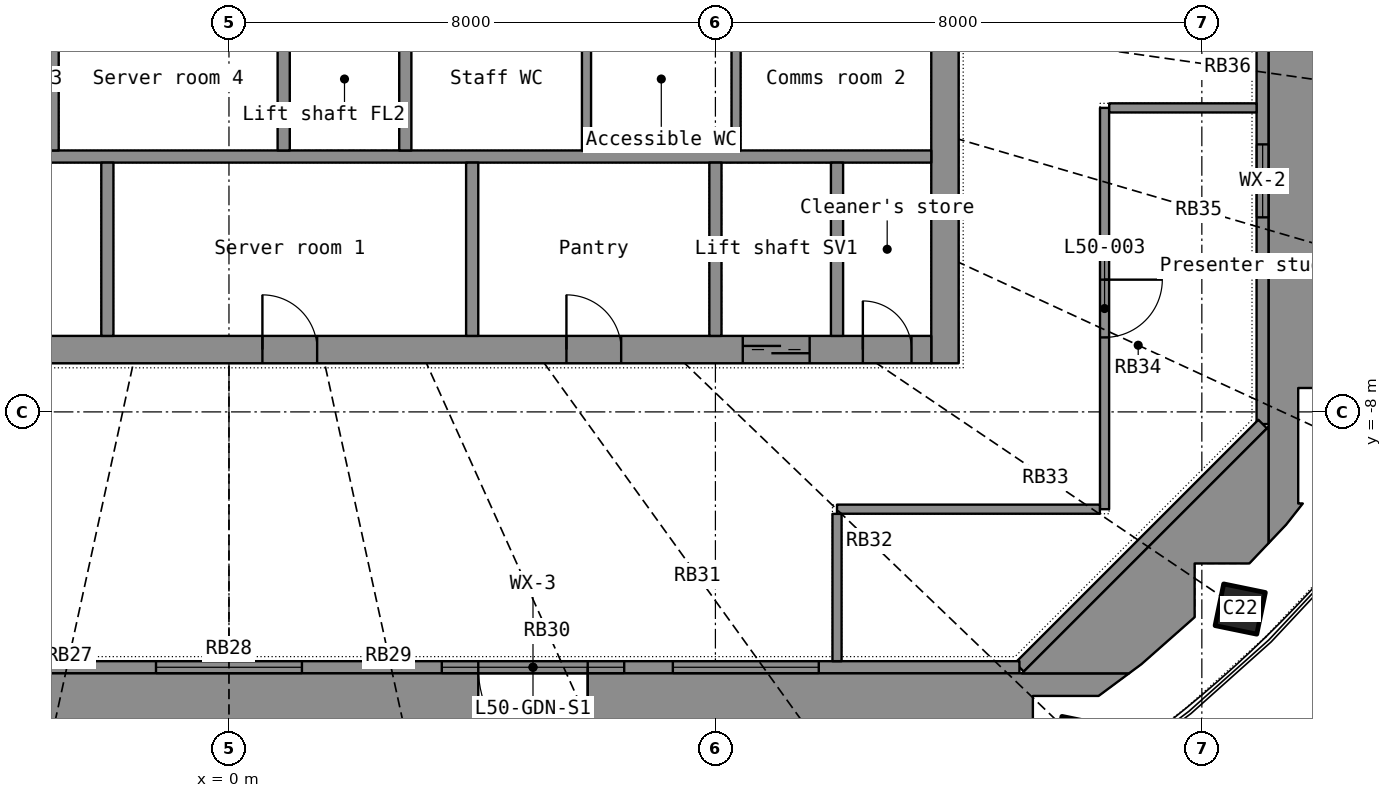
"""IFC4 building model, lengths in metres.
Left out: names, types, materials, properties, quantities, classifications, styles, units other than length and angle.
Written with IfcOpenShell. Run it as: python <this file> out.ifc"""

import sys

from ifc_helpers import new_model, si_unit, direction, frame, frame_2d, origin, origin_2d, place, context, subcontext, project, spatial, polyline, rectangle, hollow_rectangle, outline, extrude, element, fill, save


model = new_model("IFC4")
c1 = context("Model", 3, precision=1e-05, world=origin(), true_north=direction((0.0, 1.0)))
c2 = subcontext(c1, "Body", "Model", "MODEL_VIEW")
j1 = project(units=[si_unit("LENGTHUNIT", "METRE"), si_unit("PLANEANGLEUNIT", "RADIAN")], contexts=[c1])
p1 = place(None, origin())
s1 = spatial("IfcSite", under=j1, at=p1, CompositionType="ELEMENT")
p2 = place(p1, origin())
s2 = spatial("IfcBuilding", under=s1, at=p2, CompositionType="ELEMENT")
p3 = place(p2, frame((0.0, 0.0, 205.2)))
s3 = spatial("IfcBuildingStorey", under=s2, at=p3, CompositionType="ELEMENT", Elevation=205.2)
p4 = place(p3, frame((13.971, -13.421, 0.0), z_axis=(-0.022258382, 0.021697801, 0.999516768), x_axis=(-0.828160065, -0.560456529, -0.006275862)))
e1 = element("IfcColumn", 1, at=p4, inside=s3, PredefinedType="COLUMN", context=c2, shape_type="SweptSolid", body=[
    extrude(hollow_rectangle(XDim=0.7, YDim=0.7, WallThickness=0.025, at=origin_2d()), origin(), (0.0, 0.0, 1.0), 7.404),
])
p5 = place(p3, frame((16.631, -11.243, 0.0), z_axis=(-0.026511305, 0.018201791, 0.999482789), x_axis=(-0.720516136, -0.693407857, -0.006483911)))
e2 = element("IfcColumn", 2, at=p5, inside=s3, PredefinedType="COLUMN", context=c2, shape_type="SweptSolid", body=[
    extrude(hollow_rectangle(XDim=0.7, YDim=0.7, WallThickness=0.025, at=origin_2d()), origin(), (0.0, 0.0, 1.0), 7.404),
])
p6 = place(p3, frame((18.535, -8.557, 0.0), z_axis=(-0.029972624, 0.014178469, 0.999450155), x_axis=(-0.583640912, -0.811989828, -0.005983767)))
e3 = element("IfcColumn", 3, at=p6, inside=s3, PredefinedType="COLUMN", context=c2, shape_type="SweptSolid", body=[
    extrude(hollow_rectangle(XDim=1.1, YDim=1.1, WallThickness=0.032, at=origin_2d()), origin(), (0.0, 0.0, 1.0), 7.404),
])
p7 = place(p3, frame((17.0, 8.2, 0.08), z_axis=(0.0, 0.0, 1.0), x_axis=(0.0, -1.0, 0.0)))
e4 = element("IfcWall", 4, at=p7, inside=s3, PredefinedType="STANDARD", context=c2, shape_type="SweptSolid", body=[
    extrude(rectangle(XDim=16.4, YDim=0.2, at=frame_2d((8.2, 0.0))), origin(), (0.0, 0.0, 1.0), 7.12),
])
p8 = place(p7, frame((7.3, 0.0, 0.0)))
e5 = element("IfcOpeningElement", 5, at=p8, cuts=e4, PredefinedType="OPENING", context=c2, shape_type="SweptSolid", body=[
    extrude(rectangle(XDim=1.8, YDim=2.4, at=frame_2d((0.9, 1.2))), frame((0.0, 0.11, 0.0), z_axis=(0.0, -1.0, 0.0), x_axis=(1.0, 0.0, 0.0)), (0.0, 0.0, 1.0), 0.22),
])
p9 = place(p7, frame((3.4, 0.0, 0.1)))
e6 = element("IfcOpeningElement", 6, at=p9, cuts=e4, PredefinedType="OPENING", context=c2, shape_type="SweptSolid", body=[
    extrude(rectangle(XDim=1.2, YDim=2.2, at=frame_2d((0.6, 1.1))), frame((0.0, 0.11, 0.0), z_axis=(0.0, -1.0, 0.0), x_axis=(1.0, 0.0, 0.0)), (0.0, 0.0, 1.0), 0.22),
])
p10 = place(p7, frame((11.8, 0.0, 0.1)))
e7 = element("IfcOpeningElement", 7, at=p10, cuts=e4, PredefinedType="OPENING", context=c2, shape_type="SweptSolid", body=[
    extrude(rectangle(XDim=1.2, YDim=2.2, at=frame_2d((0.6, 1.1))), frame((0.0, 0.11, 0.0), z_axis=(0.0, -1.0, 0.0), x_axis=(1.0, 0.0, 0.0)), (0.0, 0.0, 1.0), 0.22),
])
p11 = place(p3, frame((17.0, -8.2, 0.08), z_axis=(0.0, 0.0, 1.0), x_axis=(-0.707106781, -0.707106781, 0.0)))
e8 = element("IfcWall", 8, at=p11, inside=s3, PredefinedType="STANDARD", context=c2, shape_type="SweptSolid", body=[
    extrude(rectangle(XDim=5.657, YDim=0.2, at=frame_2d((2.828, 0.0))), origin(), (0.0, 0.0, 1.0), 7.12),
])
p12 = place(p3, frame((13.0, -12.2, 0.08), z_axis=(0.0, 0.0, 1.0), x_axis=(-1.0, 0.0, 0.0)))
e9 = element("IfcWall", 9, at=p12, inside=s3, PredefinedType="STANDARD", context=c2, shape_type="SweptSolid", body=[
    extrude(rectangle(XDim=26.0, YDim=0.2, at=frame_2d((13.0, 0.0))), origin(), (0.0, 0.0, 1.0), 7.12),
])
p13 = place(p12, frame((7.1, 0.0, 0.0)))
e10 = element("IfcOpeningElement", 10, at=p13, cuts=e9, PredefinedType="OPENING", context=c2, shape_type="SweptSolid", body=[
    extrude(rectangle(XDim=1.8, YDim=2.4, at=frame_2d((0.9, 1.2))), frame((0.0, 0.11, 0.0), z_axis=(0.0, -1.0, 0.0), x_axis=(1.0, 0.0, 0.0)), (0.0, 0.0, 1.0), 0.22),
])
p14 = place(p12, frame((17.1, 0.0, 0.0)))
e11 = element("IfcOpeningElement", 11, at=p14, cuts=e9, PredefinedType="OPENING", context=c2, shape_type="SweptSolid", body=[
    extrude(rectangle(XDim=1.8, YDim=2.4, at=frame_2d((0.9, 1.2))), frame((0.0, 0.11, 0.0), z_axis=(0.0, -1.0, 0.0), x_axis=(1.0, 0.0, 0.0)), (0.0, 0.0, 1.0), 0.22),
])
p15 = place(p12, frame((3.3, 0.0, 0.9)))
e12 = element("IfcOpeningElement", 12, at=p15, cuts=e9, PredefinedType="OPENING", context=c2, shape_type="SweptSolid", body=[
    extrude(rectangle(XDim=2.4, YDim=1.5, at=frame_2d((1.2, 0.75))), frame((0.0, 0.11, 0.0), z_axis=(0.0, -1.0, 0.0), x_axis=(1.0, 0.0, 0.0)), (0.0, 0.0, 1.0), 0.22),
])
p16 = place(p12, frame((11.8, 0.0, 0.9)))
e13 = element("IfcOpeningElement", 13, at=p16, cuts=e9, PredefinedType="OPENING", context=c2, shape_type="SweptSolid", body=[
    extrude(rectangle(XDim=2.4, YDim=1.5, at=frame_2d((1.2, 0.75))), frame((0.0, 0.11, 0.0), z_axis=(0.0, -1.0, 0.0), x_axis=(1.0, 0.0, 0.0)), (0.0, 0.0, 1.0), 0.22),
])
p17 = place(p12, frame((20.3, 0.0, 0.9)))
e14 = element("IfcOpeningElement", 14, at=p17, cuts=e9, PredefinedType="OPENING", context=c2, shape_type="SweptSolid", body=[
    extrude(rectangle(XDim=2.4, YDim=1.5, at=frame_2d((1.2, 0.75))), frame((0.0, 0.11, 0.0), z_axis=(0.0, -1.0, 0.0), x_axis=(1.0, 0.0, 0.0)), (0.0, 0.0, 1.0), 0.22),
])
p18 = place(p12, frame((6.5, 0.0, 3.2)))
e15 = element("IfcOpeningElement", 15, at=p18, cuts=e9, PredefinedType="OPENING", context=c2, shape_type="SweptSolid", body=[
    extrude(rectangle(XDim=3.0, YDim=1.0, at=frame_2d((1.5, 0.5))), frame((0.0, 0.11, 0.0), z_axis=(0.0, -1.0, 0.0), x_axis=(1.0, 0.0, 0.0)), (0.0, 0.0, 1.0), 0.22),
])
p19 = place(p12, frame((16.5, 0.0, 3.2)))
e16 = element("IfcOpeningElement", 16, at=p19, cuts=e9, PredefinedType="OPENING", context=c2, shape_type="SweptSolid", body=[
    extrude(rectangle(XDim=3.0, YDim=1.0, at=frame_2d((1.5, 0.5))), frame((0.0, 0.11, 0.0), z_axis=(0.0, -1.0, 0.0), x_axis=(1.0, 0.0, 0.0)), (0.0, 0.0, 1.0), 0.22),
])
p20 = place(p3, frame((0.0, 0.0, -0.4)))
e17 = element("IfcWall", 17, at=p20, inside=s3, PredefinedType="ELEMENTEDWALL", context=c2, shape_type="SweptSolid", body=[
    extrude(outline(polyline([(1.85, -17.113), (3.032, -16.987), (3.032, -16.56), (4.1, -16.56), (4.1, -12.3), (-4.1, -12.3), (-4.1, -16.56), (-3.032, -16.56), (-3.032, -16.987), (-1.85, -17.113), (-0.95, -17.145), (-0.95, -16.331), (0.95, -16.331), (0.95, -17.145), (1.85, -17.113)])), origin(), (0.0, 0.0, 1.0), 1.58),
])
p21 = place(p3, frame((0.0, 0.0, -0.4)))
e18 = element("IfcWall", 18, at=p21, inside=s3, PredefinedType="ELEMENTEDWALL", context=c2, shape_type="SweptSolid", body=[
    extrude(outline(polyline([(14.803, -12.3), (13.042, -12.3), (5.9, -12.3), (5.9, -16.49), (6.696, -16.286), (6.696, -15.756), (8.196, -15.756), (8.196, -15.829), (8.97, -15.569), (9.8, -15.22), (9.8, -13.974), (11.7, -13.974), (11.7, -14.317), (12.175, -14.072), (13.221, -13.422), (13.221, -12.671), (14.302, -12.671), (14.803, -12.3)])), origin(), (0.0, 0.0, 1.0), 1.58),
])
p22 = place(p3, frame((0.0, 0.0, -0.4)))
e19 = element("IfcWall", 19, at=p22, inside=s3, PredefinedType="ELEMENTEDWALL", context=c2, shape_type="SweptSolid", body=[
    extrude(outline(polyline([(17.1, -10.156), (17.1, -8.241), (13.042, -12.3), (14.803, -12.3), (15.009, -12.147), (15.881, -11.377), (15.881, -10.493), (16.781, -10.493), (17.1, -10.156)])), origin(), (0.0, 0.0, 1.0), 1.58),
])
p23 = place(p3, frame((0.0, 0.0, -0.4)))
e20 = element("IfcWall", 20, at=p23, inside=s3, PredefinedType="ELEMENTEDWALL", context=c2, shape_type="SweptSolid", body=[
    extrude(outline(polyline([(20.503, -4.446), (20.687, -3.773), (20.567, -3.773), (20.567, -2.273), (21.019, -2.273), (21.145, -1.497), (21.175, -0.95), (20.39, -0.95), (20.39, -0.9), (17.1, -0.9), (17.1, -8.241), (17.1, -10.156), (17.387, -9.853), (17.66, -9.507), (17.585, -9.507), (17.585, -7.607), (19.014, -7.607), (19.237, -7.26), (19.606, -6.54), (19.606, -5.212), (20.205, -5.212), (20.503, -4.446)])), origin(), (0.0, 0.0, 1.0), 1.58),
])
p24 = place(p3, frame((11.775, -7.2, 0.0), z_axis=(0.0, 0.0, 1.0), x_axis=(0.0, 1.0, 0.0)))
e21 = element("IfcWall", 21, at=p24, inside=s3, PredefinedType="SHEAR", context=c2, shape_type="SweptSolid", body=[
    extrude(rectangle(XDim=14.4, YDim=0.45, at=frame_2d((7.2, 0.0))), origin(), (0.0, 0.0, 1.0), 7.0),
])
p25 = place(p24, frame((6.5, 0.0, 0.0)))
e22 = element("IfcOpeningElement", 22, at=p25, cuts=e21, PredefinedType="OPENING", context=c2, shape_type="SweptSolid", body=[
    extrude(rectangle(XDim=1.4, YDim=2.2, at=frame_2d((0.7, 1.1))), frame((0.0, 0.235, 0.0), z_axis=(0.0, -1.0, 0.0), x_axis=(1.0, 0.0, 0.0)), (0.0, 0.0, 1.0), 0.47),
])
p26 = place(p3, frame((-11.55, -6.975, 0.0), z_axis=(0.0, 0.0, 1.0), x_axis=(1.0, 0.0, 0.0)))
e23 = element("IfcWall", 23, at=p26, inside=s3, PredefinedType="SHEAR", context=c2, shape_type="SweptSolid", body=[
    extrude(rectangle(XDim=23.1, YDim=0.45, at=frame_2d((11.55, 0.0))), origin(), (0.0, 0.0, 1.0), 7.0),
])
p27 = place(p26, frame((20.0, 0.0, 0.0)))
e24 = element("IfcOpeningElement", 24, at=p27, cuts=e23, PredefinedType="OPENING", context=c2, shape_type="SweptSolid", body=[
    extrude(rectangle(XDim=1.1, YDim=2.2, at=frame_2d((0.55, 1.1))), frame((0.0, 0.235, 0.0), z_axis=(0.0, -1.0, 0.0), x_axis=(1.0, 0.0, 0.0)), (0.0, 0.0, 1.0), 0.47),
])
p28 = place(p26, frame((5.1, 0.0, 0.0)))
e25 = element("IfcOpeningElement", 25, at=p28, cuts=e23, PredefinedType="OPENING", context=c2, shape_type="SweptSolid", body=[
    extrude(rectangle(XDim=0.9, YDim=2.1, at=frame_2d((0.45, 1.05))), frame((0.0, 0.235, 0.0), z_axis=(0.0, -1.0, 0.0), x_axis=(1.0, 0.0, 0.0)), (0.0, 0.0, 1.0), 0.47),
])
p29 = place(p26, frame((12.1, 0.0, 0.0)))
e26 = element("IfcOpeningElement", 26, at=p29, cuts=e23, PredefinedType="OPENING", context=c2, shape_type="SweptSolid", body=[
    extrude(rectangle(XDim=0.9, YDim=2.1, at=frame_2d((0.45, 1.05))), frame((0.0, 0.235, 0.0), z_axis=(0.0, -1.0, 0.0), x_axis=(1.0, 0.0, 0.0)), (0.0, 0.0, 1.0), 0.47),
])
p30 = place(p26, frame((17.1, 0.0, 0.0)))
e27 = element("IfcOpeningElement", 27, at=p30, cuts=e23, PredefinedType="OPENING", context=c2, shape_type="SweptSolid", body=[
    extrude(rectangle(XDim=0.9, YDim=2.1, at=frame_2d((0.45, 1.05))), frame((0.0, 0.235, 0.0), z_axis=(0.0, -1.0, 0.0), x_axis=(1.0, 0.0, 0.0)), (0.0, 0.0, 1.0), 0.47),
])
p31 = place(p26, frame((0.325, 0.0, 0.0)))
e28 = element("IfcOpeningElement", 28, at=p31, cuts=e23, PredefinedType="OPENING", context=c2, shape_type="SweptSolid", body=[
    extrude(rectangle(XDim=0.8, YDim=2.05, at=frame_2d((0.4, 1.025))), frame((0.0, 0.235, 0.0), z_axis=(0.0, -1.0, 0.0), x_axis=(1.0, 0.0, 0.0)), (0.0, 0.0, 1.0), 0.47),
])
p32 = place(p26, frame((21.975, 0.0, 0.0)))
e29 = element("IfcOpeningElement", 29, at=p32, cuts=e23, PredefinedType="OPENING", context=c2, shape_type="SweptSolid", body=[
    extrude(rectangle(XDim=0.8, YDim=2.05, at=frame_2d((0.4, 1.025))), frame((0.0, 0.235, 0.0), z_axis=(0.0, -1.0, 0.0), x_axis=(1.0, 0.0, 0.0)), (0.0, 0.0, 1.0), 0.47),
])
p33 = place(p3, frame((-11.55, -3.8, 0.0), z_axis=(0.0, 0.0, 1.0), x_axis=(1.0, 0.0, 0.0)))
e30 = element("IfcWall", 30, at=p33, inside=s3, PredefinedType="SHEAR", context=c2, shape_type="SweptSolid", body=[
    extrude(rectangle(XDim=23.1, YDim=0.2, at=frame_2d((11.55, 0.0))), origin(), (0.0, 0.0, 1.0), 7.0),
])
for number, where, z_axis, x_axis in (
    (31, (8.0, -6.75, 0.0), (0.0, 0.0, 1.0), (0.0, 1.0, 0.0)),
    (32, (10.0, -6.75, 0.0), (0.0, 0.0, 1.0), (0.0, 1.0, 0.0)),
):
    element("IfcWall", number, at=place(p3, frame(where, z_axis=z_axis, x_axis=x_axis)), inside=s3, PredefinedType="SHEAR", context=c2, shape_type="SweptSolid", body=[
        extrude(rectangle(XDim=2.85, YDim=0.2, at=frame_2d((1.425, 0.0))), origin(), (0.0, 0.0, 1.0), 7.0),
    ])
for number, where, z_axis, x_axis in (
    (33, (-2.0, -6.75, 0.0), (0.0, 0.0, 1.0), (0.0, 1.0, 0.0)),
    (34, (4.0, -6.75, 0.0), (0.0, 0.0, 1.0), (0.0, 1.0, 0.0)),
):
    element("IfcWall", number, at=place(p3, frame(where, z_axis=z_axis, x_axis=x_axis)), inside=s3, PredefinedType="PARTITIONING", context=c2, shape_type="SweptSolid", body=[
        extrude(rectangle(XDim=2.85, YDim=0.2, at=frame_2d((1.425, 0.0))), origin(), (0.0, 0.0, 1.0), 7.0),
    ])
p34 = place(p3, frame((-2.9, -3.7, 0.0), z_axis=(0.0, 0.0, 1.0), x_axis=(0.0, 1.0, 0.0)))
e35 = element("IfcWall", 35, at=p34, inside=s3, PredefinedType="SHEAR", context=c2, shape_type="SweptSolid", body=[
    extrude(rectangle(XDim=7.4, YDim=0.2, at=frame_2d((3.7, 0.0))), origin(), (0.0, 0.0, 1.0), 7.0),
])
p35 = place(p34, frame((3.1, 0.0, 0.0)))
e36 = element("IfcOpeningElement", 36, at=p35, cuts=e35, PredefinedType="OPENING", context=c2, shape_type="SweptSolid", body=[
    extrude(rectangle(XDim=1.2, YDim=2.2, at=frame_2d((0.6, 1.1))), frame((0.0, 0.11, 0.0), z_axis=(0.0, -1.0, 0.0), x_axis=(1.0, 0.0, 0.0)), (0.0, 0.0, 1.0), 0.22),
])
p36 = place(p3, frame((2.9, -3.7, 0.0), z_axis=(0.0, 0.0, 1.0), x_axis=(0.0, 1.0, 0.0)))
e37 = element("IfcWall", 37, at=p36, inside=s3, PredefinedType="SHEAR", context=c2, shape_type="SweptSolid", body=[
    extrude(rectangle(XDim=7.4, YDim=0.2, at=frame_2d((3.7, 0.0))), origin(), (0.0, 0.0, 1.0), 7.0),
])
p37 = place(p36, frame((3.1, 0.0, 0.0)))
e38 = element("IfcOpeningElement", 38, at=p37, cuts=e37, PredefinedType="OPENING", context=c2, shape_type="SweptSolid", body=[
    extrude(rectangle(XDim=1.2, YDim=2.2, at=frame_2d((0.6, 1.1))), frame((0.0, 0.11, 0.0), z_axis=(0.0, -1.0, 0.0), x_axis=(1.0, 0.0, 0.0)), (0.0, 0.0, 1.0), 0.22),
])
p38 = place(p3, frame((0.9, -3.7, 0.0), z_axis=(0.0, 0.0, 1.0), x_axis=(0.0, 1.0, 0.0)))
e39 = element("IfcWall", 39, at=p38, inside=s3, PredefinedType="SHEAR", context=c2, shape_type="SweptSolid", body=[
    extrude(rectangle(XDim=2.35, YDim=0.2, at=frame_2d((1.175, 0.0))), origin(), (0.0, 0.0, 1.0), 7.0),
])
for number, where, z_axis, x_axis in (
    (40, (5.88, -3.7, 0.0), (0.0, 0.0, 1.0), (0.0, 1.0, 0.0)),
    (41, (8.34, -3.7, 0.0), (0.0, 0.0, 1.0), (0.0, 1.0, 0.0)),
):
    element("IfcWall", number, at=place(p3, frame(where, z_axis=z_axis, x_axis=x_axis)), inside=s3, PredefinedType="PARTITIONING", context=c2, shape_type="SweptSolid", body=[
        extrude(rectangle(XDim=2.35, YDim=0.15, at=frame_2d((1.175, 0.0))), origin(), (0.0, 0.0, 1.0), 7.0),
    ])
p39 = place(p3, frame((14.4, -3.0, 0.0), z_axis=(0.0, 0.0, 1.0), x_axis=(0.0, -1.0, 0.0)))
e42 = element("IfcWall", 42, at=p39, inside=s3, PredefinedType="PARTITIONING", context=c2, shape_type="SweptSolid", body=[
    extrude(rectangle(XDim=6.6, YDim=0.15, at=frame_2d((3.3, 0.0))), origin(), (0.0, 0.0, 1.0), 6.1),
])
p40 = place(p39, frame((2.825, 0.0, 0.0)))
e43 = element("IfcOpeningElement", 43, at=p40, cuts=e42, PredefinedType="OPENING", context=c2, shape_type="SweptSolid", body=[
    extrude(rectangle(XDim=0.95, YDim=2.15, at=frame_2d((0.475, 1.075))), frame((0.0, 0.085, 0.0), z_axis=(0.0, -1.0, 0.0), x_axis=(1.0, 0.0, 0.0)), (0.0, 0.0, 1.0), 0.17),
])
p41 = place(p3, frame((14.323, -9.6, 0.0), z_axis=(0.0, 0.0, 1.0), x_axis=(-1.0, 0.0, 0.0)))
e44 = element("IfcWall", 44, at=p41, inside=s3, PredefinedType="PARTITIONING", context=c2, shape_type="SweptSolid", body=[
    extrude(rectangle(XDim=4.323, YDim=0.15, at=frame_2d((2.162, 0.0))), origin(), (0.0, 0.0, 1.0), 6.1),
])
p42 = place(p3, frame((10.0, -9.677, 0.0), z_axis=(0.0, 0.0, 1.0), x_axis=(0.0, -1.0, 0.0)))
e45 = element("IfcWall", 45, at=p42, inside=s3, PredefinedType="PARTITIONING", context=c2, shape_type="SweptSolid", body=[
    extrude(rectangle(XDim=2.423, YDim=0.15, at=frame_2d((1.211, 0.0))), origin(), (0.0, 0.0, 1.0), 6.1),
])
p43 = place(p3, frame((16.9, -3.0, 0.0), z_axis=(0.0, 0.0, 1.0), x_axis=(-1.0, 0.0, 0.0)))
e46 = element("IfcWall", 46, at=p43, inside=s3, PredefinedType="PARTITIONING", context=c2, shape_type="SweptSolid", body=[
    extrude(rectangle(XDim=2.423, YDim=0.15, at=frame_2d((1.211, 0.0))), origin(), (0.0, 0.0, 1.0), 6.1),
])
p44 = place(p10, origin())
e47 = element("IfcWindow", 47, at=p44, inside=s3, PartitioningType="SINGLE_PANEL", PredefinedType="WINDOW", context=c2, shape_type="SweptSolid", body=[
    extrude(rectangle(XDim=1.2, YDim=2.2, at=frame_2d((0.6, 1.1))), frame((0.0, 0.03, 0.0), z_axis=(0.0, -1.0, 0.0), x_axis=(1.0, 0.0, 0.0)), (0.0, 0.0, 1.0), 0.06),
])
fill(e7, e47)
p45 = place(p13, origin())
e48 = element("IfcDoor", 48, at=p45, inside=s3, OperationType="DOUBLE_DOOR_SINGLE_SWING", PredefinedType="DOOR", context=c2, shape_type="SweptSolid", body=[
    extrude(rectangle(XDim=1.8, YDim=2.4, at=frame_2d((0.9, 1.2))), frame((0.0, 0.025, 0.0), z_axis=(0.0, -1.0, 0.0), x_axis=(1.0, 0.0, 0.0)), (0.0, 0.0, 1.0), 0.05),
])
fill(e10, e48)
p46 = place(p15, origin())
e49 = element("IfcWindow", 49, at=p46, inside=s3, PartitioningType="SINGLE_PANEL", PredefinedType="WINDOW", context=c2, shape_type="SweptSolid", body=[
    extrude(rectangle(XDim=2.4, YDim=1.5, at=frame_2d((1.2, 0.75))), frame((0.0, 0.03, 0.0), z_axis=(0.0, -1.0, 0.0), x_axis=(1.0, 0.0, 0.0)), (0.0, 0.0, 1.0), 0.06),
])
fill(e12, e49)
p47 = place(p16, origin())
e50 = element("IfcWindow", 50, at=p47, inside=s3, PartitioningType="SINGLE_PANEL", PredefinedType="WINDOW", context=c2, shape_type="SweptSolid", body=[
    extrude(rectangle(XDim=2.4, YDim=1.5, at=frame_2d((1.2, 0.75))), frame((0.0, 0.03, 0.0), z_axis=(0.0, -1.0, 0.0), x_axis=(1.0, 0.0, 0.0)), (0.0, 0.0, 1.0), 0.06),
])
fill(e13, e50)
p48 = place(p18, origin())
e51 = element("IfcWindow", 51, at=p48, inside=s3, PartitioningType="SINGLE_PANEL", PredefinedType="WINDOW", context=c2, shape_type="SweptSolid", body=[
    extrude(rectangle(XDim=3.0, YDim=1.0, at=frame_2d((1.5, 0.5))), frame((0.0, 0.03, 0.0), z_axis=(0.0, -1.0, 0.0), x_axis=(1.0, 0.0, 0.0)), (0.0, 0.0, 1.0), 0.06),
])
fill(e15, e51)
p49 = place(p27, origin())
e52 = element("IfcDoor", 52, at=p49, inside=s3, OperationType="DOUBLE_DOOR_SLIDING", PredefinedType="DOOR", context=c2, shape_type="SweptSolid", body=[
    extrude(rectangle(XDim=1.1, YDim=2.2, at=frame_2d((0.55, 1.1))), frame((0.0, 0.025, 0.0), z_axis=(0.0, -1.0, 0.0), x_axis=(1.0, 0.0, 0.0)), (0.0, 0.0, 1.0), 0.05),
])
fill(e24, e52)
p50 = place(p29, origin())
e53 = element("IfcDoor", 53, at=p50, inside=s3, OperationType="SINGLE_SWING_LEFT", PredefinedType="DOOR", context=c2, shape_type="SweptSolid", body=[
    extrude(rectangle(XDim=0.9, YDim=2.1, at=frame_2d((0.45, 1.05))), frame((0.0, 0.025, 0.0), z_axis=(0.0, -1.0, 0.0), x_axis=(1.0, 0.0, 0.0)), (0.0, 0.0, 1.0), 0.05),
])
fill(e26, e53)
p51 = place(p30, origin())
e54 = element("IfcDoor", 54, at=p51, inside=s3, OperationType="SINGLE_SWING_LEFT", PredefinedType="DOOR", context=c2, shape_type="SweptSolid", body=[
    extrude(rectangle(XDim=0.9, YDim=2.1, at=frame_2d((0.45, 1.05))), frame((0.0, 0.025, 0.0), z_axis=(0.0, -1.0, 0.0), x_axis=(1.0, 0.0, 0.0)), (0.0, 0.0, 1.0), 0.05),
])
fill(e27, e54)
p52 = place(p32, origin())
e55 = element("IfcDoor", 55, at=p52, inside=s3, OperationType="SINGLE_SWING_LEFT", PredefinedType="DOOR", context=c2, shape_type="SweptSolid", body=[
    extrude(rectangle(XDim=0.8, YDim=2.05, at=frame_2d((0.4, 1.025))), frame((0.0, 0.025, 0.0), z_axis=(0.0, -1.0, 0.0), x_axis=(1.0, 0.0, 0.0)), (0.0, 0.0, 1.0), 0.05),
])
fill(e29, e55)
p53 = place(p40, origin())
e56 = element("IfcDoor", 56, at=p53, inside=s3, OperationType="SINGLE_SWING_LEFT", PredefinedType="DOOR", context=c2, shape_type="SweptSolid", body=[
    extrude(rectangle(XDim=0.95, YDim=2.15, at=frame_2d((0.475, 1.075))), frame((0.0, 0.025, 0.0), z_axis=(0.0, -1.0, 0.0), x_axis=(1.0, 0.0, 0.0)), (0.0, 0.0, 1.0), 0.05),
])
fill(e43, e56)
save(model, sys.argv[1])
